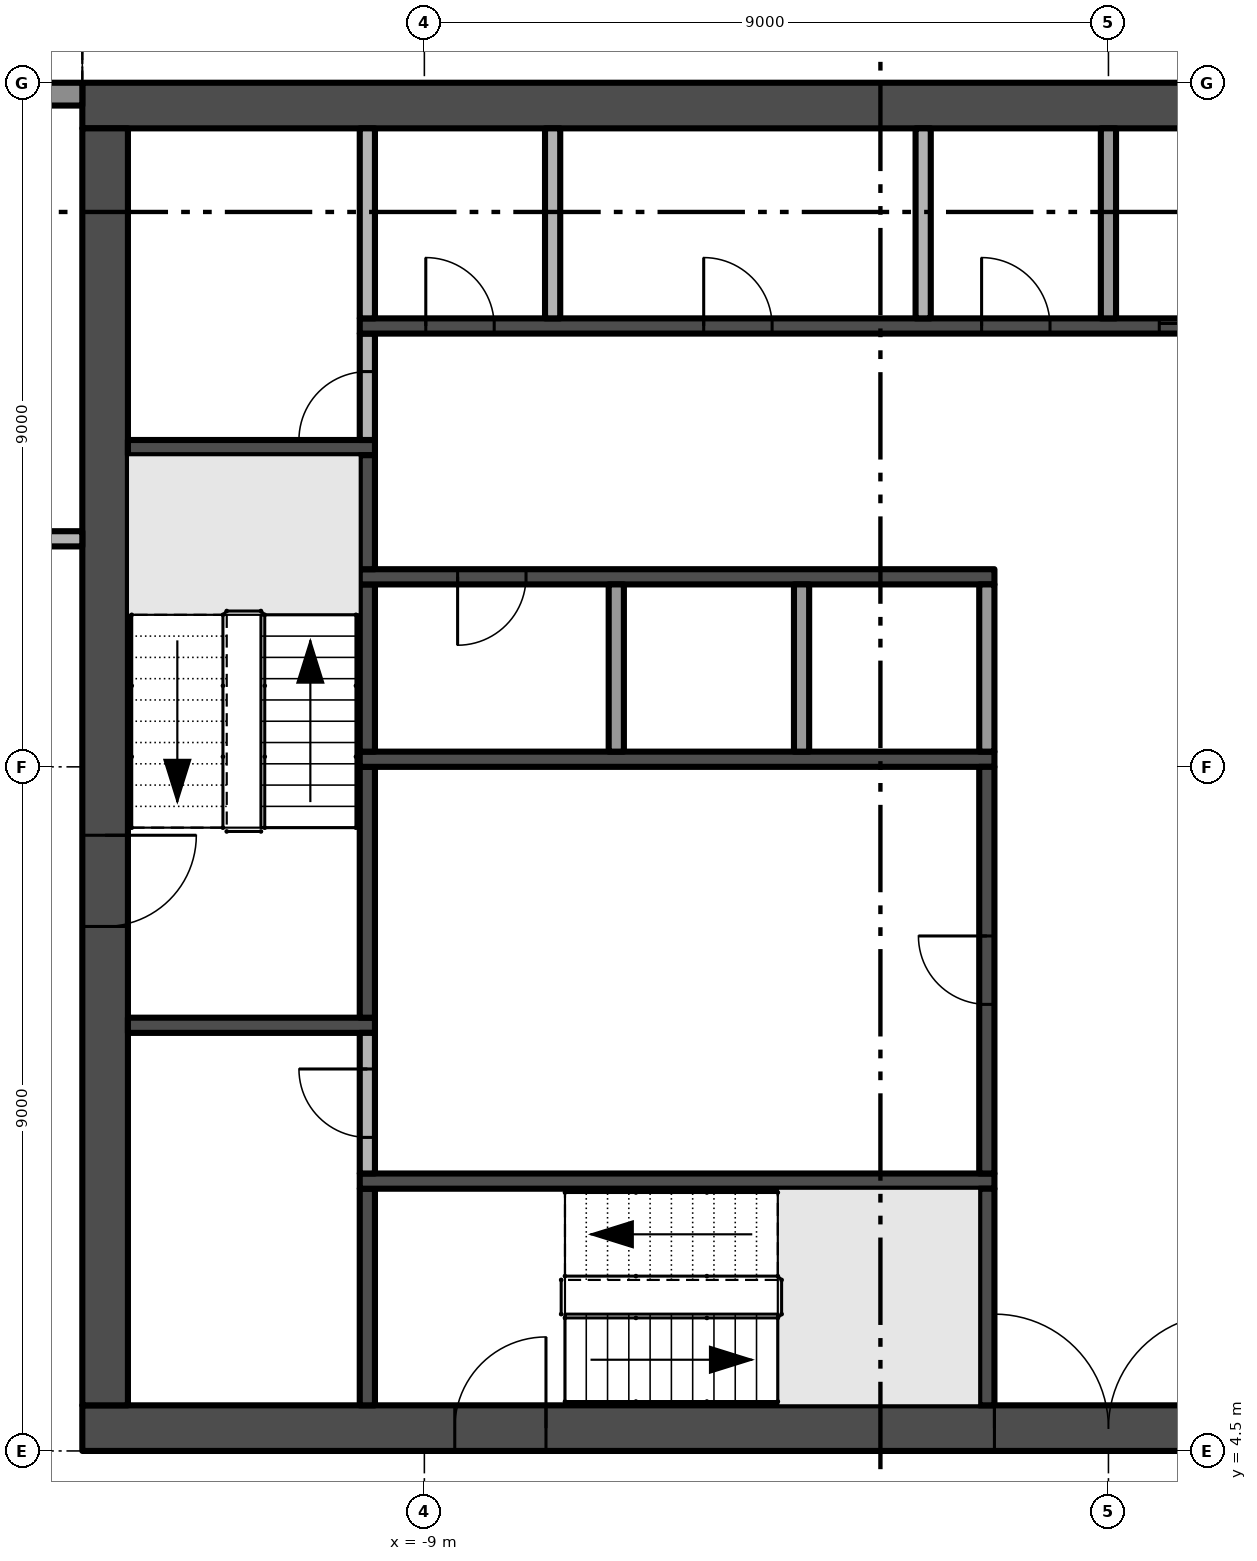
"""IFC4 building model, lengths in metres.
Left out: names, types, materials, properties, quantities, classifications, styles, units other than length and angle.
Written with IfcOpenShell. Run it as: python <this file> out.ifc"""

import sys

from ifc_helpers import new_model, si_unit, direction, frame, frame_2d, origin, place, context, subcontext, project, spatial, polyline, rectangle, outline, extrude, element, fill, save


model = new_model("IFC4")
c1 = context("Model", 3, precision=1e-05, world=origin(), true_north=direction((0.0, 1.0)))
c2 = subcontext(c1, "Body", "Model", "MODEL_VIEW")
j1 = project(units=[si_unit("LENGTHUNIT", "METRE"), si_unit("PLANEANGLEUNIT", "RADIAN")], contexts=[c1])
p1 = place(None, origin())
s1 = spatial("IfcSite", under=j1, at=p1, CompositionType="ELEMENT")
p2 = place(p1, origin())
s2 = spatial("IfcBuilding", under=s1, at=p2, CompositionType="ELEMENT")
p3 = place(p2, frame((0.0, 0.0, 265.4)))
s3 = spatial("IfcBuildingStorey", under=s2, at=p3, CompositionType="ELEMENT", Elevation=265.4)
p4 = place(p3, frame((-13.5, 4.8, -0.3), z_axis=(0.0, 0.0, 1.0), x_axis=(1.0, 0.0, 0.0)))
e1 = element("IfcWall", 1, at=p4, inside=s3, PredefinedType="SHEAR", context=c2, shape_type="SweptSolid", body=[
    extrude(rectangle(XDim=27.0, YDim=0.6, at=frame_2d((13.5, 0.0))), origin(), (0.0, 0.0, 1.0), 3.8),
])
p5 = place(p4, frame((12.0, 0.0, 0.3)))
e2 = element("IfcOpeningElement", 2, at=p5, cuts=e1, PredefinedType="OPENING", context=c2, shape_type="SweptSolid", body=[
    extrude(rectangle(XDim=3.0, YDim=2.4, at=frame_2d((1.5, 1.2))), frame((0.0, 0.31, 0.0), z_axis=(0.0, -1.0, 0.0), x_axis=(1.0, 0.0, 0.0)), (0.0, 0.0, 1.0), 0.62),
])
p6 = place(p4, frame((4.9, 0.0, 0.3)))
e3 = element("IfcOpeningElement", 3, at=p6, cuts=e1, PredefinedType="OPENING", context=c2, shape_type="SweptSolid", body=[
    extrude(rectangle(XDim=1.2, YDim=2.2, at=frame_2d((0.6, 1.1))), frame((0.0, 0.31, 0.0), z_axis=(0.0, -1.0, 0.0), x_axis=(1.0, 0.0, 0.0)), (0.0, 0.0, 1.0), 0.62),
])
p7 = place(p4, frame((20.75, 0.0, 0.3)))
e4 = element("IfcOpeningElement", 4, at=p7, cuts=e1, PredefinedType="OPENING", context=c2, shape_type="SweptSolid", body=[
    extrude(rectangle(XDim=1.5, YDim=2.2, at=frame_2d((0.75, 1.1))), frame((0.0, 0.31, 0.0), z_axis=(0.0, -1.0, 0.0), x_axis=(1.0, 0.0, 0.0)), (0.0, 0.0, 1.0), 0.62),
])
p8 = place(p4, frame((17.4, 0.0, 0.3)))
e5 = element("IfcOpeningElement", 5, at=p8, cuts=e1, PredefinedType="OPENING", context=c2, shape_type="SweptSolid", body=[
    extrude(rectangle(XDim=1.2, YDim=2.2, at=frame_2d((0.6, 1.1))), frame((0.0, 0.31, 0.0), z_axis=(0.0, -1.0, 0.0), x_axis=(1.0, 0.0, 0.0)), (0.0, 0.0, 1.0), 0.62),
])
p9 = place(p3, frame((13.5, 22.2, -0.3), z_axis=(0.0, 0.0, 1.0), x_axis=(-1.0, 0.0, 0.0)))
e6 = element("IfcWall", 6, at=p9, inside=s3, PredefinedType="SHEAR", context=c2, shape_type="SweptSolid", body=[
    extrude(rectangle(XDim=27.0, YDim=0.6, at=frame_2d((13.5, 0.0))), origin(), (0.0, 0.0, 1.0), 3.8),
])
p10 = place(p3, frame((-13.2, 21.9, -0.3), z_axis=(0.0, 0.0, 1.0), x_axis=(0.0, -1.0, 0.0)))
e7 = element("IfcWall", 7, at=p10, inside=s3, PredefinedType="SHEAR", context=c2, shape_type="SweptSolid", body=[
    extrude(rectangle(XDim=16.8, YDim=0.6, at=frame_2d((8.4, 0.0))), origin(), (0.0, 0.0, 1.0), 3.8),
])
p11 = place(p10, frame((9.3, 0.0, 0.3)))
e8 = element("IfcOpeningElement", 8, at=p11, cuts=e7, PredefinedType="OPENING", context=c2, shape_type="SweptSolid", body=[
    extrude(rectangle(XDim=1.2, YDim=2.2, at=frame_2d((0.6, 1.1))), frame((0.0, 0.31, 0.0), z_axis=(0.0, -1.0, 0.0), x_axis=(1.0, 0.0, 0.0)), (0.0, 0.0, 1.0), 0.62),
])
p12 = place(p3, frame((-17.55, 22.35, 0.0), z_axis=(0.0, 0.0, 1.0), x_axis=(1.0, 0.0, 0.0)))
e9 = element("IfcWall", 9, at=p12, inside=s3, PredefinedType="SOLIDWALL", context=c2, shape_type="SweptSolid", body=[
    extrude(rectangle(XDim=4.05, YDim=0.3, at=frame_2d((2.025, 0.0))), origin(), (0.0, 0.0, 1.0), 3.5),
])
p13 = place(p12, frame((0.3, 0.0, 0.45)))
e10 = element("IfcOpeningElement", 10, at=p13, cuts=e9, PredefinedType="OPENING", context=c2, shape_type="SweptSolid", body=[
    extrude(rectangle(XDim=3.2, YDim=2.65, at=frame_2d((1.6, 1.325))), frame((0.0, 0.16, 0.0), z_axis=(0.0, -1.0, 0.0), x_axis=(1.0, 0.0, 0.0)), (0.0, 0.0, 1.0), 0.32),
])
p14 = place(p3, origin())
e11 = element("IfcWall", 11, at=p14, inside=s3, PredefinedType="USERDEFINED", context=c2, shape_type="SweptSolid", body=[
    extrude(outline(polyline([(-13.5, 23.1), (-15.0, 23.329), (-16.5, 23.929), (-18.0, 24.671), (-19.5, 25.271), (-21.0, 25.5), (-22.5, 25.271), (-22.462, 25.024), (-21.0, 25.247), (-19.566, 25.028), (-18.102, 24.442), (-16.602, 23.701), (-15.066, 23.086), (-13.538, 22.853), (-13.5, 23.1)])), origin(), (0.0, 0.0, 1.0), 0.9),
])
for number, where, z_axis, x_axis in (
    (12, (-12.9, 10.1, 0.0), (0.0, 0.0, 1.0), (1.0, 0.0, 0.0)),
    (13, (-12.9, 17.7, 0.0), (0.0, 0.0, 1.0), (1.0, 0.0, 0.0)),
):
    element("IfcWall", number, at=place(p3, frame(where, z_axis=z_axis, x_axis=x_axis)), inside=s3, PredefinedType="SHEAR", context=c2, shape_type="SweptSolid", body=[
        extrude(rectangle(XDim=3.25, YDim=0.2, at=frame_2d((1.625, 0.0))), origin(), (0.0, 0.0, 1.0), 3.5),
    ])
p15 = place(p3, frame((-9.75, 5.1, 0.0), z_axis=(0.0, 0.0, 1.0), x_axis=(0.0, 1.0, 0.0)))
e14 = element("IfcWall", 14, at=p15, inside=s3, PredefinedType="SHEAR", context=c2, shape_type="SweptSolid", body=[
    extrude(rectangle(XDim=2.85, YDim=0.2, at=frame_2d((1.425, 0.0))), origin(), (0.0, 0.0, 1.0), 3.5),
])
p16 = place(p3, frame((-9.85, 8.05, 0.0), z_axis=(0.0, 0.0, 1.0), x_axis=(1.0, 0.0, 0.0)))
e15 = element("IfcWall", 15, at=p16, inside=s3, PredefinedType="SHEAR", context=c2, shape_type="SweptSolid", body=[
    extrude(rectangle(XDim=8.35, YDim=0.2, at=frame_2d((4.175, 0.0))), origin(), (0.0, 0.0, 1.0), 3.5),
])
p17 = place(p3, frame((-9.75, 8.15, 0.0), z_axis=(0.0, 0.0, 1.0), x_axis=(0.0, 1.0, 0.0)))
e16 = element("IfcWall", 16, at=p17, inside=s3, PredefinedType="PARTITIONING", context=c2, shape_type="SweptSolid", body=[
    extrude(rectangle(XDim=1.85, YDim=0.2, at=frame_2d((0.925, 0.0))), origin(), (0.0, 0.0, 1.0), 3.5),
])
p18 = place(p17, frame((0.475, 0.0, 0.0)))
e17 = element("IfcOpeningElement", 17, at=p18, cuts=e16, PredefinedType="OPENING", context=c2, shape_type="SweptSolid", body=[
    extrude(rectangle(XDim=0.9, YDim=2.1, at=frame_2d((0.45, 1.05))), frame((0.0, 0.11, 0.0), z_axis=(0.0, -1.0, 0.0), x_axis=(1.0, 0.0, 0.0)), (0.0, 0.0, 1.0), 0.22),
])
p19 = place(p3, frame((-9.75, 10.2, 0.0), z_axis=(0.0, 0.0, 1.0), x_axis=(0.0, 1.0, 0.0)))
e18 = element("IfcWall", 18, at=p19, inside=s3, PredefinedType="SHEAR", context=c2, shape_type="SweptSolid", body=[
    extrude(rectangle(XDim=3.3, YDim=0.2, at=frame_2d((1.65, 0.0))), origin(), (0.0, 0.0, 1.0), 3.5),
])
p20 = place(p3, frame((-9.85, 13.6, 0.0), z_axis=(0.0, 0.0, 1.0), x_axis=(1.0, 0.0, 0.0)))
e19 = element("IfcWall", 19, at=p20, inside=s3, PredefinedType="SHEAR", context=c2, shape_type="SweptSolid", body=[
    extrude(rectangle(XDim=8.35, YDim=0.2, at=frame_2d((4.175, 0.0))), origin(), (0.0, 0.0, 1.0), 3.5),
])
p21 = place(p3, frame((-9.75, 13.7, 0.0), z_axis=(0.0, 0.0, 1.0), x_axis=(0.0, 1.0, 0.0)))
e20 = element("IfcWall", 20, at=p21, inside=s3, PredefinedType="SHEAR", context=c2, shape_type="SweptSolid", body=[
    extrude(rectangle(XDim=2.2, YDim=0.2, at=frame_2d((1.1, 0.0))), origin(), (0.0, 0.0, 1.0), 3.5),
])
p22 = place(p3, frame((-1.5, 16.0, 0.0), z_axis=(0.0, 0.0, 1.0), x_axis=(-1.0, 0.0, 0.0)))
e21 = element("IfcWall", 21, at=p22, inside=s3, PredefinedType="SHEAR", context=c2, shape_type="SweptSolid", body=[
    extrude(rectangle(XDim=8.35, YDim=0.2, at=frame_2d((4.175, 0.0))), origin(), (0.0, 0.0, 1.0), 3.5),
])
p23 = place(p22, frame((6.162, 0.0, 0.0)))
e22 = element("IfcOpeningElement", 22, at=p23, cuts=e21, PredefinedType="OPENING", context=c2, shape_type="SweptSolid", body=[
    extrude(rectangle(XDim=0.9, YDim=2.1, at=frame_2d((0.45, 1.05))), frame((0.0, 0.11, 0.0), z_axis=(0.0, -1.0, 0.0), x_axis=(1.0, 0.0, 0.0)), (0.0, 0.0, 1.0), 0.22),
])
p24 = place(p3, frame((-9.75, 16.1, 0.0), z_axis=(0.0, 0.0, 1.0), x_axis=(0.0, 1.0, 0.0)))
e23 = element("IfcWall", 23, at=p24, inside=s3, PredefinedType="SHEAR", context=c2, shape_type="SweptSolid", body=[
    extrude(rectangle(XDim=1.5, YDim=0.2, at=frame_2d((0.75, 0.0))), origin(), (0.0, 0.0, 1.0), 3.5),
])
p25 = place(p3, frame((-9.75, 17.8, 0.0), z_axis=(0.0, 0.0, 1.0), x_axis=(0.0, 1.0, 0.0)))
e24 = element("IfcWall", 24, at=p25, inside=s3, PredefinedType="PARTITIONING", context=c2, shape_type="SweptSolid", body=[
    extrude(rectangle(XDim=1.4, YDim=0.2, at=frame_2d((0.7, 0.0))), origin(), (0.0, 0.0, 1.0), 3.5),
])
p26 = place(p25, origin())
e25 = element("IfcOpeningElement", 25, at=p26, cuts=e24, PredefinedType="OPENING", context=c2, shape_type="SweptSolid", body=[
    extrude(rectangle(XDim=0.9, YDim=2.1, at=frame_2d((0.45, 1.05))), frame((0.0, 0.11, 0.0), z_axis=(0.0, -1.0, 0.0), x_axis=(1.0, 0.0, 0.0)), (0.0, 0.0, 1.0), 0.22),
])
p27 = place(p3, frame((-9.85, 19.3, 0.0), z_axis=(0.0, 0.0, 1.0), x_axis=(1.0, 0.0, 0.0)))
e26 = element("IfcWall", 26, at=p27, inside=s3, PredefinedType="SHEAR", context=c2, shape_type="SweptSolid", body=[
    extrude(rectangle(XDim=19.7, YDim=0.2, at=frame_2d((9.85, 0.0))), origin(), (0.0, 0.0, 1.0), 3.5),
])
p28 = place(p27, frame((10.519, 0.0, 0.0)))
e27 = element("IfcOpeningElement", 27, at=p28, cuts=e26, PredefinedType="OPENING", context=c2, shape_type="SweptSolid", body=[
    extrude(rectangle(XDim=1.1, YDim=2.1, at=frame_2d((0.55, 1.05))), frame((0.0, 0.11, 0.0), z_axis=(0.0, -1.0, 0.0), x_axis=(1.0, 0.0, 0.0)), (0.0, 0.0, 1.0), 0.22),
])
p29 = place(p27, frame((12.956, 0.0, 0.0)))
e28 = element("IfcOpeningElement", 28, at=p29, cuts=e26, PredefinedType="OPENING", context=c2, shape_type="SweptSolid", body=[
    extrude(rectangle(XDim=1.1, YDim=2.1, at=frame_2d((0.55, 1.05))), frame((0.0, 0.11, 0.0), z_axis=(0.0, -1.0, 0.0), x_axis=(1.0, 0.0, 0.0)), (0.0, 0.0, 1.0), 0.22),
])
p30 = place(p27, frame((15.394, 0.0, 0.0)))
e29 = element("IfcOpeningElement", 29, at=p30, cuts=e26, PredefinedType="OPENING", context=c2, shape_type="SweptSolid", body=[
    extrude(rectangle(XDim=1.1, YDim=2.1, at=frame_2d((0.55, 1.05))), frame((0.0, 0.11, 0.0), z_axis=(0.0, -1.0, 0.0), x_axis=(1.0, 0.0, 0.0)), (0.0, 0.0, 1.0), 0.22),
])
p31 = place(p27, frame((17.831, 0.0, 0.0)))
e30 = element("IfcOpeningElement", 30, at=p31, cuts=e26, PredefinedType="OPENING", context=c2, shape_type="SweptSolid", body=[
    extrude(rectangle(XDim=1.1, YDim=2.1, at=frame_2d((0.55, 1.05))), frame((0.0, 0.11, 0.0), z_axis=(0.0, -1.0, 0.0), x_axis=(1.0, 0.0, 0.0)), (0.0, 0.0, 1.0), 0.22),
])
p32 = place(p27, frame((0.869, 0.0, 0.0)))
e31 = element("IfcOpeningElement", 31, at=p32, cuts=e26, PredefinedType="OPENING", context=c2, shape_type="SweptSolid", body=[
    extrude(rectangle(XDim=0.9, YDim=2.1, at=frame_2d((0.45, 1.05))), frame((0.0, 0.11, 0.0), z_axis=(0.0, -1.0, 0.0), x_axis=(1.0, 0.0, 0.0)), (0.0, 0.0, 1.0), 0.22),
])
p33 = place(p27, frame((4.525, 0.0, 0.0)))
e32 = element("IfcOpeningElement", 32, at=p33, cuts=e26, PredefinedType="OPENING", context=c2, shape_type="SweptSolid", body=[
    extrude(rectangle(XDim=0.9, YDim=2.1, at=frame_2d((0.45, 1.05))), frame((0.0, 0.11, 0.0), z_axis=(0.0, -1.0, 0.0), x_axis=(1.0, 0.0, 0.0)), (0.0, 0.0, 1.0), 0.22),
])
p34 = place(p27, frame((8.181, 0.0, 0.0)))
e33 = element("IfcOpeningElement", 33, at=p34, cuts=e26, PredefinedType="OPENING", context=c2, shape_type="SweptSolid", body=[
    extrude(rectangle(XDim=0.9, YDim=2.1, at=frame_2d((0.45, 1.05))), frame((0.0, 0.11, 0.0), z_axis=(0.0, -1.0, 0.0), x_axis=(1.0, 0.0, 0.0)), (0.0, 0.0, 1.0), 0.22),
])
for number, where, z_axis, x_axis in (
    (34, (-9.75, 19.4, 0.0), (0.0, 0.0, 1.0), (0.0, 1.0, 0.0)),
    (35, (-7.312, 19.4, 0.0), (0.0, 0.0, 1.0), (0.0, 1.0, 0.0)),
):
    element("IfcWall", number, at=place(p3, frame(where, z_axis=z_axis, x_axis=x_axis)), inside=s3, PredefinedType="PARTITIONING", context=c2, shape_type="SweptSolid", body=[
        extrude(rectangle(XDim=2.5, YDim=0.2, at=frame_2d((1.25, 0.0))), origin(), (0.0, 0.0, 1.0), 3.5),
    ])
for number, where, z_axis, x_axis in (
    (36, (-6.475, 13.7, 0.0), (0.0, 0.0, 1.0), (0.0, 1.0, 0.0)),
    (37, (-4.037, 13.7, 0.0), (0.0, 0.0, 1.0), (0.0, 1.0, 0.0)),
):
    element("IfcWall", number, at=place(p3, frame(where, z_axis=z_axis, x_axis=x_axis)), inside=s3, PredefinedType="PARTITIONING", context=c2, shape_type="SweptSolid", body=[
        extrude(rectangle(XDim=2.2, YDim=0.2, at=frame_2d((1.1, 0.0))), origin(), (0.0, 0.0, 1.0), 3.5),
    ])
p35 = place(p3, frame((-2.438, 19.4, 0.0), z_axis=(0.0, 0.0, 1.0), x_axis=(0.0, 1.0, 0.0)))
e38 = element("IfcWall", 38, at=p35, inside=s3, PredefinedType="PARTITIONING", context=c2, shape_type="SweptSolid", body=[
    extrude(rectangle(XDim=2.5, YDim=0.2, at=frame_2d((1.25, 0.0))), origin(), (0.0, 0.0, 1.0), 3.5),
])
p36 = place(p3, frame((-1.6, 5.1, 0.0), z_axis=(0.0, 0.0, 1.0), x_axis=(0.0, 1.0, 0.0)))
e39 = element("IfcWall", 39, at=p36, inside=s3, PredefinedType="SHEAR", context=c2, shape_type="SweptSolid", body=[
    extrude(rectangle(XDim=2.85, YDim=0.2, at=frame_2d((1.425, 0.0))), origin(), (0.0, 0.0, 1.0), 3.5),
])
p37 = place(p3, frame((-1.6, 8.15, 0.0), z_axis=(0.0, 0.0, 1.0), x_axis=(0.0, 1.0, 0.0)))
e40 = element("IfcWall", 40, at=p37, inside=s3, PredefinedType="SHEAR", context=c2, shape_type="SweptSolid", body=[
    extrude(rectangle(XDim=5.35, YDim=0.2, at=frame_2d((2.675, 0.0))), origin(), (0.0, 0.0, 1.0), 3.5),
])
p38 = place(p37, frame((2.225, 0.0, 0.0)))
e41 = element("IfcOpeningElement", 41, at=p38, cuts=e40, PredefinedType="OPENING", context=c2, shape_type="SweptSolid", body=[
    extrude(rectangle(XDim=0.9, YDim=2.1, at=frame_2d((0.45, 1.05))), frame((0.0, 0.11, 0.0), z_axis=(0.0, -1.0, 0.0), x_axis=(1.0, 0.0, 0.0)), (0.0, 0.0, 1.0), 0.22),
])
p39 = place(p3, frame((-1.6, 13.7, 0.0), z_axis=(0.0, 0.0, 1.0), x_axis=(0.0, 1.0, 0.0)))
e42 = element("IfcWall", 42, at=p39, inside=s3, PredefinedType="PARTITIONING", context=c2, shape_type="SweptSolid", body=[
    extrude(rectangle(XDim=2.2, YDim=0.2, at=frame_2d((1.1, 0.0))), origin(), (0.0, 0.0, 1.0), 3.5),
])
p40 = place(p3, frame((0.0, 19.4, 0.0), z_axis=(0.0, 0.0, 1.0), x_axis=(0.0, 1.0, 0.0)))
e43 = element("IfcWall", 43, at=p40, inside=s3, PredefinedType="PARTITIONING", context=c2, shape_type="SweptSolid", body=[
    extrude(rectangle(XDim=2.5, YDim=0.2, at=frame_2d((1.25, 0.0))), origin(), (0.0, 0.0, 1.0), 3.5),
])
p41 = place(p3, frame((-17.325, 16.5, 0.0), z_axis=(0.0, 0.0, 1.0), x_axis=(1.0, 0.0, 0.0)))
e44 = element("IfcWall", 44, at=p41, inside=s3, PredefinedType="PARTITIONING", context=c2, shape_type="SweptSolid", body=[
    extrude(rectangle(XDim=3.825, YDim=0.2, at=frame_2d((1.913, 0.0))), origin(), (0.0, 0.0, 1.0), 3.5),
])
p42 = place(p41, frame((1.35, 0.0, 0.0)))
e45 = element("IfcOpeningElement", 45, at=p42, cuts=e44, PredefinedType="OPENING", context=c2, shape_type="SweptSolid", body=[
    extrude(rectangle(XDim=0.9, YDim=2.1, at=frame_2d((0.45, 1.05))), frame((0.0, 0.11, 0.0), z_axis=(0.0, -1.0, 0.0), x_axis=(1.0, 0.0, 0.0)), (0.0, 0.0, 1.0), 0.22),
])
p43 = place(p5, frame((3.0, 0.0, 0.0), z_axis=(0.0, 0.0, 1.0), x_axis=(-1.0, 0.0, 0.0)))
e46 = element("IfcDoor", 46, at=p43, inside=s3, OperationType="DOUBLE_DOOR_SINGLE_SWING", PredefinedType="DOOR", context=c2, shape_type="SweptSolid", body=[
    extrude(rectangle(XDim=3.0, YDim=2.4, at=frame_2d((1.5, 1.2))), frame((0.0, 0.025, 0.0), z_axis=(0.0, -1.0, 0.0), x_axis=(1.0, 0.0, 0.0)), (0.0, 0.0, 1.0), 0.05),
])
fill(e2, e46)
p44 = place(p11, frame((1.2, 0.0, 0.0), z_axis=(0.0, 0.0, 1.0), x_axis=(-1.0, 0.0, 0.0)))
e47 = element("IfcDoor", 47, at=p44, inside=s3, OperationType="SINGLE_SWING_RIGHT", PredefinedType="DOOR", context=c2, shape_type="SweptSolid", body=[
    extrude(rectangle(XDim=1.2, YDim=2.2, at=frame_2d((0.6, 1.1))), frame((0.0, 0.025, 0.0), z_axis=(0.0, -1.0, 0.0), x_axis=(1.0, 0.0, 0.0)), (0.0, 0.0, 1.0), 0.05),
])
fill(e8, e47)
p45 = place(p6, frame((1.2, 0.0, 0.0), z_axis=(0.0, 0.0, 1.0), x_axis=(-1.0, 0.0, 0.0)))
e48 = element("IfcDoor", 48, at=p45, inside=s3, OperationType="SINGLE_SWING_LEFT", PredefinedType="DOOR", context=c2, shape_type="SweptSolid", body=[
    extrude(rectangle(XDim=1.2, YDim=2.2, at=frame_2d((0.6, 1.1))), frame((0.0, 0.025, 0.0), z_axis=(0.0, -1.0, 0.0), x_axis=(1.0, 0.0, 0.0)), (0.0, 0.0, 1.0), 0.05),
])
fill(e3, e48)
p46 = place(p28, origin())
e49 = element("IfcDoor", 49, at=p46, inside=s3, OperationType="SLIDING_TO_RIGHT", PredefinedType="DOOR", context=c2, shape_type="SweptSolid", body=[
    extrude(rectangle(XDim=1.1, YDim=2.1, at=frame_2d((0.55, 1.05))), frame((0.0, 0.025, 0.0), z_axis=(0.0, -1.0, 0.0), x_axis=(1.0, 0.0, 0.0)), (0.0, 0.0, 1.0), 0.05),
])
fill(e27, e49)
p47 = place(p38, origin())
e50 = element("IfcDoor", 50, at=p47, inside=s3, OperationType="SINGLE_SWING_RIGHT", PredefinedType="DOOR", context=c2, shape_type="SweptSolid", body=[
    extrude(rectangle(XDim=0.9, YDim=2.1, at=frame_2d((0.45, 1.05))), frame((0.0, 0.025, 0.0), z_axis=(0.0, -1.0, 0.0), x_axis=(1.0, 0.0, 0.0)), (0.0, 0.0, 1.0), 0.05),
])
fill(e41, e50)
p48 = place(p23, origin())
e51 = element("IfcDoor", 51, at=p48, inside=s3, OperationType="SINGLE_SWING_RIGHT", PredefinedType="DOOR", context=c2, shape_type="SweptSolid", body=[
    extrude(rectangle(XDim=0.9, YDim=2.1, at=frame_2d((0.45, 1.05))), frame((0.0, 0.025, 0.0), z_axis=(0.0, -1.0, 0.0), x_axis=(1.0, 0.0, 0.0)), (0.0, 0.0, 1.0), 0.05),
])
fill(e22, e51)
p49 = place(p26, origin())
e52 = element("IfcDoor", 52, at=p49, inside=s3, OperationType="SINGLE_SWING_LEFT", PredefinedType="DOOR", context=c2, shape_type="SweptSolid", body=[
    extrude(rectangle(XDim=0.9, YDim=2.1, at=frame_2d((0.45, 1.05))), frame((0.0, 0.025, 0.0), z_axis=(0.0, -1.0, 0.0), x_axis=(1.0, 0.0, 0.0)), (0.0, 0.0, 1.0), 0.05),
])
fill(e25, e52)
p50 = place(p32, origin())
e53 = element("IfcDoor", 53, at=p50, inside=s3, OperationType="SINGLE_SWING_LEFT", PredefinedType="DOOR", context=c2, shape_type="SweptSolid", body=[
    extrude(rectangle(XDim=0.9, YDim=2.1, at=frame_2d((0.45, 1.05))), frame((0.0, 0.025, 0.0), z_axis=(0.0, -1.0, 0.0), x_axis=(1.0, 0.0, 0.0)), (0.0, 0.0, 1.0), 0.05),
])
fill(e31, e53)
p51 = place(p33, origin())
e54 = element("IfcDoor", 54, at=p51, inside=s3, OperationType="SINGLE_SWING_LEFT", PredefinedType="DOOR", context=c2, shape_type="SweptSolid", body=[
    extrude(rectangle(XDim=0.9, YDim=2.1, at=frame_2d((0.45, 1.05))), frame((0.0, 0.025, 0.0), z_axis=(0.0, -1.0, 0.0), x_axis=(1.0, 0.0, 0.0)), (0.0, 0.0, 1.0), 0.05),
])
fill(e32, e54)
p52 = place(p34, origin())
e55 = element("IfcDoor", 55, at=p52, inside=s3, OperationType="SINGLE_SWING_LEFT", PredefinedType="DOOR", context=c2, shape_type="SweptSolid", body=[
    extrude(rectangle(XDim=0.9, YDim=2.1, at=frame_2d((0.45, 1.05))), frame((0.0, 0.025, 0.0), z_axis=(0.0, -1.0, 0.0), x_axis=(1.0, 0.0, 0.0)), (0.0, 0.0, 1.0), 0.05),
])
fill(e33, e55)
p53 = place(p18, origin())
e56 = element("IfcDoor", 56, at=p53, inside=s3, OperationType="SINGLE_SWING_RIGHT", PredefinedType="DOOR", context=c2, shape_type="SweptSolid", body=[
    extrude(rectangle(XDim=0.9, YDim=2.1, at=frame_2d((0.45, 1.05))), frame((0.0, 0.025, 0.0), z_axis=(0.0, -1.0, 0.0), x_axis=(1.0, 0.0, 0.0)), (0.0, 0.0, 1.0), 0.05),
])
fill(e17, e56)
save(model, sys.argv[1])
